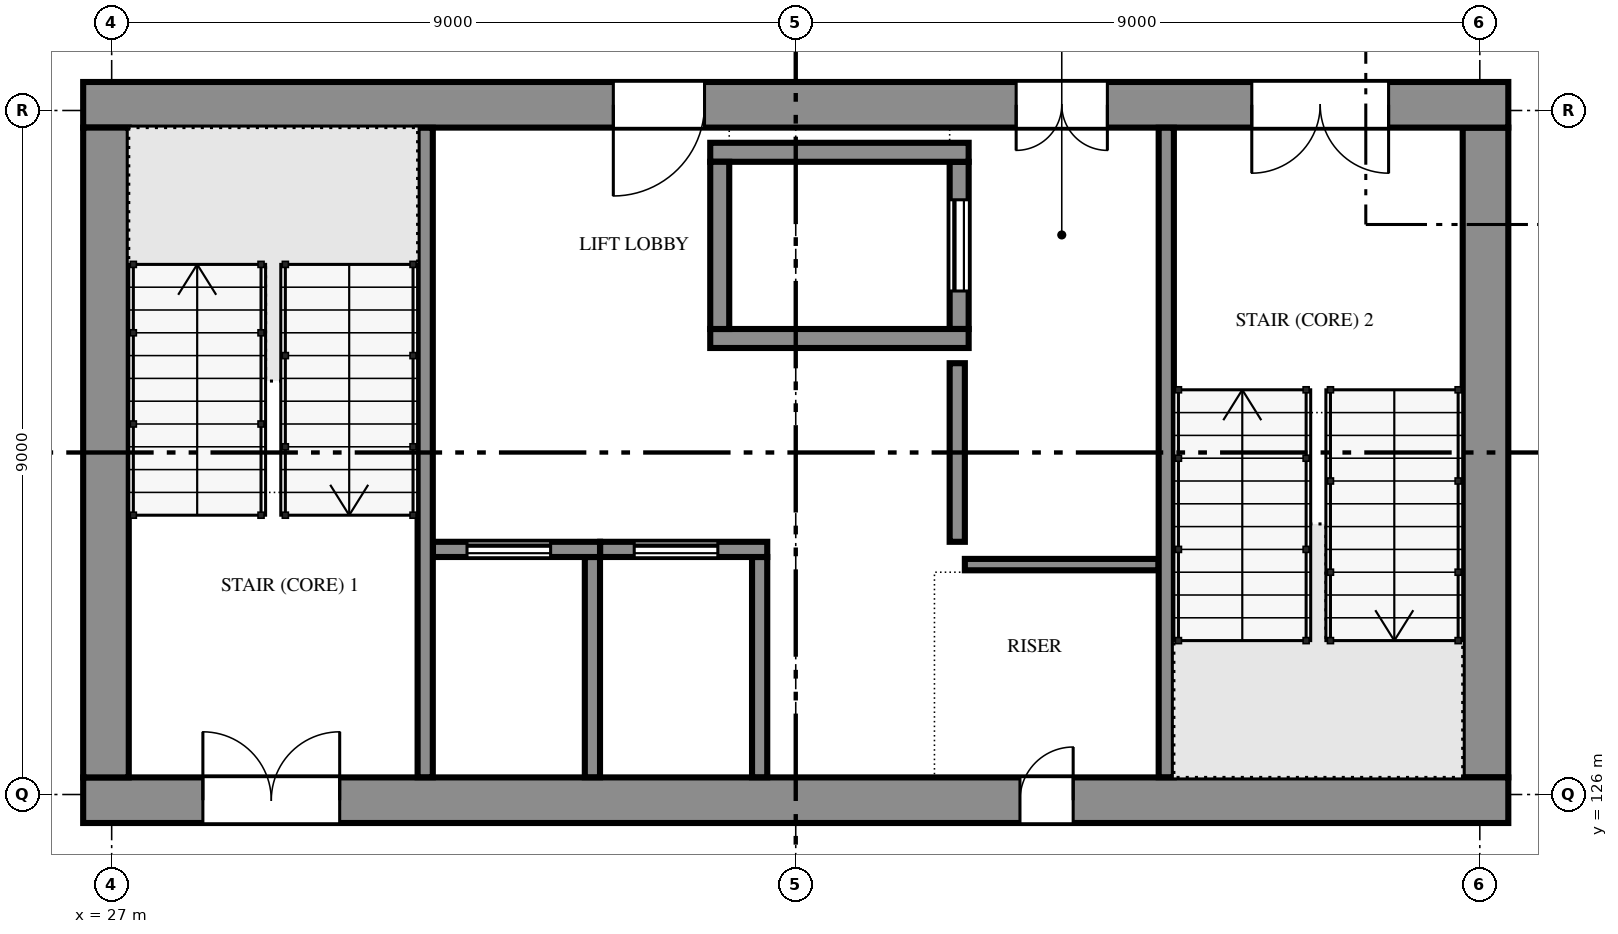
"""IFC4 building model, lengths in metres.
Left out: names, types, materials, properties, quantities, classifications, styles, units other than length and angle.
Written with IfcOpenShell. Run it as: python <this file> out.ifc"""

import sys

from ifc_helpers import new_model, si_unit, direction, frame, frame_2d, origin, place, context, subcontext, project, spatial, polyline, rectangle, outline, extrude, element, fill, save


model = new_model("IFC4")
c1 = context("Model", 3, precision=1e-05, world=origin(), true_north=direction((0.0, 1.0)))
c2 = subcontext(c1, "Body", "Model", "MODEL_VIEW")
j1 = project(units=[si_unit("LENGTHUNIT", "METRE"), si_unit("PLANEANGLEUNIT", "RADIAN")], contexts=[c1])
p1 = place(None, origin())
s1 = spatial("IfcSite", under=j1, at=p1, CompositionType="ELEMENT")
p2 = place(p1, origin())
s2 = spatial("IfcBuilding", under=s1, at=p2, CompositionType="ELEMENT")
p3 = place(p2, frame((0.0, 0.0, 7.5)))
s3 = spatial("IfcBuildingStorey", under=s2, at=p3, CompositionType="ELEMENT", Elevation=7.5)
p4 = place(p3, frame((26.625, 125.925, 0.0), z_axis=(0.0, 0.0, 1.0), x_axis=(1.0, 0.0, 0.0)))
e1 = element("IfcWall", 1, at=p4, inside=s3, PredefinedType="SOLIDWALL", context=c2, shape_type="SweptSolid", body=[
    extrude(rectangle(XDim=18.75, YDim=0.6, at=frame_2d((9.375, 0.0))), origin(), (0.0, 0.0, 1.0), 4.2),
])
p5 = place(p4, frame((1.575, 0.0, 0.0)))
e2 = element("IfcOpeningElement", 2, at=p5, cuts=e1, PredefinedType="OPENING", context=c2, shape_type="SweptSolid", body=[
    extrude(rectangle(XDim=1.8, YDim=2.1, at=frame_2d((0.9, 1.05))), frame((0.0, 0.31, 0.0), z_axis=(0.0, -1.0, 0.0), x_axis=(1.0, 0.0, 0.0)), (0.0, 0.0, 1.0), 0.62),
])
p6 = place(p4, frame((12.325, 0.0, 0.0)))
e3 = element("IfcOpeningElement", 3, at=p6, cuts=e1, PredefinedType="OPENING", context=c2, shape_type="SweptSolid", body=[
    extrude(rectangle(XDim=0.7, YDim=2.0, at=frame_2d((0.35, 1.0))), frame((0.0, 0.31, 0.0), z_axis=(0.0, -1.0, 0.0), x_axis=(1.0, 0.0, 0.0)), (0.0, 0.0, 1.0), 0.62),
])
p7 = place(p3, frame((26.625, 135.075, 0.0), z_axis=(0.0, 0.0, 1.0), x_axis=(1.0, 0.0, 0.0)))
e4 = element("IfcWall", 4, at=p7, inside=s3, PredefinedType="SOLIDWALL", context=c2, shape_type="SweptSolid", body=[
    extrude(rectangle(XDim=18.75, YDim=0.6, at=frame_2d((9.375, 0.0))), origin(), (0.0, 0.0, 1.0), 4.2),
])
p8 = place(p7, frame((15.375, 0.0, 0.0)))
e5 = element("IfcOpeningElement", 5, at=p8, cuts=e4, PredefinedType="OPENING", context=c2, shape_type="SweptSolid", body=[
    extrude(rectangle(XDim=1.8, YDim=2.1, at=frame_2d((0.9, 1.05))), frame((0.0, 0.31, 0.0), z_axis=(0.0, -1.0, 0.0), x_axis=(1.0, 0.0, 0.0)), (0.0, 0.0, 1.0), 0.62),
])
p9 = place(p7, frame((6.975, 0.0, 0.0)))
e6 = element("IfcOpeningElement", 6, at=p9, cuts=e4, PredefinedType="OPENING", context=c2, shape_type="SweptSolid", body=[
    extrude(rectangle(XDim=1.2, YDim=2.1, at=frame_2d((0.6, 1.05))), frame((0.0, 0.31, 0.0), z_axis=(0.0, -1.0, 0.0), x_axis=(1.0, 0.0, 0.0)), (0.0, 0.0, 1.0), 0.62),
])
p10 = place(p7, frame((12.275, 0.0, 0.0)))
e7 = element("IfcOpeningElement", 7, at=p10, cuts=e4, PredefinedType="OPENING", context=c2, shape_type="SweptSolid", body=[
    extrude(rectangle(XDim=1.2, YDim=2.1, at=frame_2d((0.6, 1.05))), frame((0.0, 0.31, 0.0), z_axis=(0.0, -1.0, 0.0), x_axis=(1.0, 0.0, 0.0)), (0.0, 0.0, 1.0), 0.62),
])
for number, where, z_axis, x_axis in (
    (8, (26.925, 126.225, 0.0), (0.0, 0.0, 1.0), (0.0, 1.0, 0.0)),
    (9, (45.075, 126.225, 0.0), (0.0, 0.0, 1.0), (0.0, 1.0, 0.0)),
):
    element("IfcWall", number, at=place(p3, frame(where, z_axis=z_axis, x_axis=x_axis)), inside=s3, PredefinedType="SOLIDWALL", context=c2, shape_type="SweptSolid", body=[
        extrude(rectangle(XDim=8.55, YDim=0.6, at=frame_2d((4.275, 0.0))), origin(), (0.0, 0.0, 1.0), 4.2),
    ])
for number, where, z_axis, x_axis in (
    (10, (31.125, 126.227, -0.13), (0.0, 0.0, 1.0), (0.0, 1.0, 0.0)),
    (11, (40.875, 126.227, -0.13), (0.0, 0.0, 1.0), (0.0, 1.0, 0.0)),
):
    element("IfcWall", number, at=place(p3, frame(where, z_axis=z_axis, x_axis=x_axis)), inside=s3, PredefinedType="SOLIDWALL", context=c2, shape_type="SweptSolid", body=[
        extrude(rectangle(XDim=8.546, YDim=0.2, at=frame_2d((4.273, 0.0))), origin(), (0.0, 0.0, 1.0), 3.666),
    ])
p11 = place(p3, frame((31.227, 129.225, 0.0), z_axis=(0.0, 0.0, 1.0), x_axis=(1.0, 0.0, 0.0)))
e12 = element("IfcWall", 12, at=p11, inside=s3, PredefinedType="SOLIDWALL", context=c2, shape_type="SweptSolid", body=[
    extrude(rectangle(XDim=2.198, YDim=0.2, at=frame_2d((1.099, 0.0))), origin(), (0.0, 0.0, 1.0), 3.516),
])
p12 = place(p11, frame((0.448, 0.0, 0.0)))
e13 = element("IfcOpeningElement", 13, at=p12, cuts=e12, PredefinedType="OPENING", context=c2, shape_type="SweptSolid", body=[
    extrude(rectangle(XDim=1.1, YDim=2.1, at=frame_2d((0.55, 1.05))), frame((0.0, 0.11, 0.0), z_axis=(0.0, -1.0, 0.0), x_axis=(1.0, 0.0, 0.0)), (0.0, 0.0, 1.0), 0.22),
])
p13 = place(p3, frame((33.325, 126.227, 0.0), z_axis=(0.0, 0.0, 1.0), x_axis=(0.0, 1.0, 0.0)))
e14 = element("IfcWall", 14, at=p13, inside=s3, PredefinedType="SOLIDWALL", context=c2, shape_type="SweptSolid", body=[
    extrude(rectangle(XDim=2.898, YDim=0.2, at=frame_2d((1.449, 0.0))), origin(), (0.0, 0.0, 1.0), 3.516),
])
p14 = place(p3, frame((33.427, 129.225, 0.0), z_axis=(0.0, 0.0, 1.0), x_axis=(1.0, 0.0, 0.0)))
e15 = element("IfcWall", 15, at=p14, inside=s3, PredefinedType="SOLIDWALL", context=c2, shape_type="SweptSolid", body=[
    extrude(rectangle(XDim=2.198, YDim=0.2, at=frame_2d((1.099, 0.0))), origin(), (0.0, 0.0, 1.0), 3.516),
])
p15 = place(p14, frame((0.448, 0.0, 0.0)))
e16 = element("IfcOpeningElement", 16, at=p15, cuts=e15, PredefinedType="OPENING", context=c2, shape_type="SweptSolid", body=[
    extrude(rectangle(XDim=1.1, YDim=2.1, at=frame_2d((0.55, 1.05))), frame((0.0, 0.11, 0.0), z_axis=(0.0, -1.0, 0.0), x_axis=(1.0, 0.0, 0.0)), (0.0, 0.0, 1.0), 0.22),
])
p16 = place(p3, frame((35.525, 126.227, 0.0), z_axis=(0.0, 0.0, 1.0), x_axis=(0.0, 1.0, 0.0)))
e17 = element("IfcWall", 17, at=p16, inside=s3, PredefinedType="SOLIDWALL", context=c2, shape_type="SweptSolid", body=[
    extrude(rectangle(XDim=2.898, YDim=0.2, at=frame_2d((1.449, 0.0))), origin(), (0.0, 0.0, 1.0), 3.516),
])
for number, where, z_axis, x_axis in (
    (18, (34.875, 132.0, 0.0), (0.0, 0.0, 1.0), (1.0, 0.0, 0.0)),
    (19, (34.875, 134.45, 0.0), (0.0, 0.0, 1.0), (1.0, 0.0, 0.0)),
):
    element("IfcWall", number, at=place(p3, frame(where, z_axis=z_axis, x_axis=x_axis)), inside=s3, PredefinedType="SOLIDWALL", context=c2, shape_type="SweptSolid", body=[
        extrude(rectangle(XDim=3.4, YDim=0.25, at=frame_2d((1.7, 0.0))), origin(), (0.0, 0.0, 1.0), 3.516),
    ])
p17 = place(p3, frame((35.0, 132.125, 0.0), z_axis=(0.0, 0.0, 1.0), x_axis=(0.0, 1.0, 0.0)))
e20 = element("IfcWall", 20, at=p17, inside=s3, PredefinedType="SOLIDWALL", context=c2, shape_type="SweptSolid", body=[
    extrude(rectangle(XDim=2.2, YDim=0.25, at=frame_2d((1.1, 0.0))), origin(), (0.0, 0.0, 1.0), 3.516),
])
p18 = place(p3, frame((38.15, 132.125, 0.0), z_axis=(0.0, 0.0, 1.0), x_axis=(0.0, 1.0, 0.0)))
e21 = element("IfcWall", 21, at=p18, inside=s3, PredefinedType="SOLIDWALL", context=c2, shape_type="SweptSolid", body=[
    extrude(rectangle(XDim=2.2, YDim=0.25, at=frame_2d((1.1, 0.0))), origin(), (0.0, 0.0, 1.0), 3.516),
])
p19 = place(p18, frame((0.5, 0.0, 0.0)))
e22 = element("IfcOpeningElement", 22, at=p19, cuts=e21, PredefinedType="OPENING", context=c2, shape_type="SweptSolid", body=[
    extrude(rectangle(XDim=1.2, YDim=2.1, at=frame_2d((0.6, 1.05))), frame((0.0, 0.135, 0.0), z_axis=(0.0, -1.0, 0.0), x_axis=(1.0, 0.0, 0.0)), (0.0, 0.0, 1.0), 0.27),
])
p20 = place(p3, frame((38.125, 131.675, 0.0), z_axis=(0.0, 0.0, 1.0), x_axis=(0.0, -1.0, 0.0)))
e23 = element("IfcWall", 23, at=p20, inside=s3, PredefinedType="PARTITIONING", context=c2, shape_type="SweptSolid", body=[
    extrude(rectangle(XDim=2.35, YDim=0.2, at=frame_2d((1.175, 0.0))), origin(), (0.0, 0.0, 1.0), 3.382),
])
p21 = place(p3, frame((40.773, 129.025, 0.0), z_axis=(0.0, 0.0, 1.0), x_axis=(-1.0, 0.0, 0.0)))
e24 = element("IfcWall", 24, at=p21, inside=s3, PredefinedType="SOLIDWALL", context=c2, shape_type="SweptSolid", body=[
    extrude(rectangle(XDim=2.548, YDim=0.15, at=frame_2d((1.274, 0.0))), origin(), (0.0, 0.0, 1.0), 3.536),
])
p22 = place(p12, origin())
e25 = element("IfcDoor", 25, at=p22, inside=s3, OperationType="SLIDING_TO_LEFT", PredefinedType="DOOR", context=c2, shape_type="SweptSolid", body=[
    extrude(outline(polyline([(0.0, 0.0), (0.07, 0.0), (0.07, 2.03), (1.03, 2.03), (1.03, 0.0), (1.1, 0.0), (1.1, 2.1), (0.0, 2.1), (0.0, 0.0)])), frame((0.0, 0.025, 0.0), z_axis=(0.0, -1.0, 0.0), x_axis=(1.0, 0.0, 0.0)), (0.0, 0.0, 1.0), 0.05),
    extrude(rectangle(XDim=0.524, YDim=2.016, at=frame_2d((0.336, 1.018))), frame((0.0, 0.018, 0.0), z_axis=(0.0, -1.0, 0.0), x_axis=(1.0, 0.0, 0.0)), (0.0, 0.0, 1.0), 0.016),
    extrude(rectangle(XDim=0.52, YDim=2.016, at=frame_2d((0.766, 1.018))), frame((0.0, -0.002, 0.0), z_axis=(0.0, -1.0, 0.0), x_axis=(1.0, 0.0, 0.0)), (0.0, 0.0, 1.0), 0.016),
])
fill(e13, e25)
p23 = place(p15, origin())
e26 = element("IfcDoor", 26, at=p23, inside=s3, OperationType="SLIDING_TO_LEFT", PredefinedType="DOOR", context=c2, shape_type="SweptSolid", body=[
    extrude(outline(polyline([(0.0, 0.0), (0.07, 0.0), (0.07, 2.03), (1.03, 2.03), (1.03, 0.0), (1.1, 0.0), (1.1, 2.1), (0.0, 2.1), (0.0, 0.0)])), frame((0.0, 0.025, 0.0), z_axis=(0.0, -1.0, 0.0), x_axis=(1.0, 0.0, 0.0)), (0.0, 0.0, 1.0), 0.05),
    extrude(rectangle(XDim=0.524, YDim=2.016, at=frame_2d((0.336, 1.018))), frame((0.0, 0.018, 0.0), z_axis=(0.0, -1.0, 0.0), x_axis=(1.0, 0.0, 0.0)), (0.0, 0.0, 1.0), 0.016),
    extrude(rectangle(XDim=0.52, YDim=2.016, at=frame_2d((0.766, 1.018))), frame((0.0, -0.002, 0.0), z_axis=(0.0, -1.0, 0.0), x_axis=(1.0, 0.0, 0.0)), (0.0, 0.0, 1.0), 0.016),
])
fill(e16, e26)
p24 = place(p19, origin())
e27 = element("IfcDoor", 27, at=p24, inside=s3, OperationType="SLIDING_TO_LEFT", PredefinedType="DOOR", context=c2, shape_type="SweptSolid", body=[
    extrude(outline(polyline([(0.0, 0.0), (0.07, 0.0), (0.07, 2.03), (1.13, 2.03), (1.13, 0.0), (1.2, 0.0), (1.2, 2.1), (0.0, 2.1), (0.0, 0.0)])), frame((0.0, 0.025, 0.0), z_axis=(0.0, -1.0, 0.0), x_axis=(1.0, 0.0, 0.0)), (0.0, 0.0, 1.0), 0.05),
    extrude(rectangle(XDim=0.579, YDim=2.016, at=frame_2d((0.363, 1.018))), frame((0.0, 0.018, 0.0), z_axis=(0.0, -1.0, 0.0), x_axis=(1.0, 0.0, 0.0)), (0.0, 0.0, 1.0), 0.016),
    extrude(rectangle(XDim=0.575, YDim=2.016, at=frame_2d((0.839, 1.018))), frame((0.0, -0.002, 0.0), z_axis=(0.0, -1.0, 0.0), x_axis=(1.0, 0.0, 0.0)), (0.0, 0.0, 1.0), 0.016),
])
fill(e22, e27)
p25 = place(p5, origin())
e28 = element("IfcDoor", 28, at=p25, inside=s3, OperationType="DOUBLE_DOOR_SINGLE_SWING", PredefinedType="DOOR", context=c2, shape_type="SweptSolid", body=[
    extrude(outline(polyline([(0.0, 0.0), (0.07, 0.0), (0.07, 2.03), (1.73, 2.03), (1.73, 0.0), (1.8, 0.0), (1.8, 2.1), (0.0, 2.1), (0.0, 0.0)])), frame((0.0, 0.025, 0.0), z_axis=(0.0, -1.0, 0.0), x_axis=(1.0, 0.0, 0.0)), (0.0, 0.0, 1.0), 0.05),
    extrude(outline(polyline([(0.074, 0.01), (0.897, 0.01), (0.897, 2.026), (0.074, 2.026), (0.074, 0.01)]), holes=[polyline([(0.194, 0.16), (0.777, 0.16), (0.777, 1.01), (0.194, 1.01), (0.194, 0.16)]), polyline([(0.335, 1.16), (0.635, 1.16), (0.635, 1.76), (0.335, 1.76), (0.335, 1.16)])]), frame((0.0, 0.017, 0.0), z_axis=(0.0, -1.0, 0.0), x_axis=(1.0, 0.0, 0.0)), (0.0, 0.0, 1.0), 0.035),
    extrude(rectangle(XDim=0.583, YDim=0.85, at=frame_2d((0.485, 0.585))), frame((0.0, 0.009, 0.0), z_axis=(0.0, -1.0, 0.0), x_axis=(1.0, 0.0, 0.0)), (0.0, 0.0, 1.0), 0.017),
    extrude(rectangle(XDim=0.3, YDim=0.6, at=frame_2d((0.485, 1.46))), frame((0.0, 0.006, 0.0), z_axis=(0.0, -1.0, 0.0), x_axis=(1.0, 0.0, 0.0)), (0.0, 0.0, 1.0), 0.012),
    extrude(outline(polyline([(0.903, 0.01), (1.726, 0.01), (1.726, 2.026), (0.903, 2.026), (0.903, 0.01)]), holes=[polyline([(1.023, 0.16), (1.606, 0.16), (1.606, 1.01), (1.023, 1.01), (1.023, 0.16)]), polyline([(1.165, 1.16), (1.465, 1.16), (1.465, 1.76), (1.165, 1.76), (1.165, 1.16)])]), frame((0.0, 0.017, 0.0), z_axis=(0.0, -1.0, 0.0), x_axis=(1.0, 0.0, 0.0)), (0.0, 0.0, 1.0), 0.035),
    extrude(rectangle(XDim=0.583, YDim=0.85, at=frame_2d((1.314, 0.585))), frame((0.0, 0.009, 0.0), z_axis=(0.0, -1.0, 0.0), x_axis=(1.0, 0.0, 0.0)), (0.0, 0.0, 1.0), 0.017),
    extrude(rectangle(XDim=0.3, YDim=0.6, at=frame_2d((1.314, 1.46))), frame((0.0, 0.006, 0.0), z_axis=(0.0, -1.0, 0.0), x_axis=(1.0, 0.0, 0.0)), (0.0, 0.0, 1.0), 0.012),
])
fill(e2, e28)
p26 = place(p8, frame((1.8, 0.0, 0.0), z_axis=(0.0, 0.0, 1.0), x_axis=(-1.0, 0.0, 0.0)))
e29 = element("IfcDoor", 29, at=p26, inside=s3, OperationType="DOUBLE_DOOR_SINGLE_SWING", PredefinedType="DOOR", context=c2, shape_type="SweptSolid", body=[
    extrude(outline(polyline([(0.0, 0.0), (0.07, 0.0), (0.07, 2.03), (1.73, 2.03), (1.73, 0.0), (1.8, 0.0), (1.8, 2.1), (0.0, 2.1), (0.0, 0.0)])), frame((0.0, 0.025, 0.0), z_axis=(0.0, -1.0, 0.0), x_axis=(1.0, 0.0, 0.0)), (0.0, 0.0, 1.0), 0.05),
    extrude(outline(polyline([(0.074, 0.01), (0.897, 0.01), (0.897, 2.026), (0.074, 2.026), (0.074, 0.01)]), holes=[polyline([(0.194, 0.16), (0.777, 0.16), (0.777, 1.01), (0.194, 1.01), (0.194, 0.16)]), polyline([(0.335, 1.16), (0.635, 1.16), (0.635, 1.76), (0.335, 1.76), (0.335, 1.16)])]), frame((0.0, 0.017, 0.0), z_axis=(0.0, -1.0, 0.0), x_axis=(1.0, 0.0, 0.0)), (0.0, 0.0, 1.0), 0.035),
    extrude(rectangle(XDim=0.583, YDim=0.85, at=frame_2d((0.485, 0.585))), frame((0.0, 0.009, 0.0), z_axis=(0.0, -1.0, 0.0), x_axis=(1.0, 0.0, 0.0)), (0.0, 0.0, 1.0), 0.017),
    extrude(rectangle(XDim=0.3, YDim=0.6, at=frame_2d((0.485, 1.46))), frame((0.0, 0.006, 0.0), z_axis=(0.0, -1.0, 0.0), x_axis=(1.0, 0.0, 0.0)), (0.0, 0.0, 1.0), 0.012),
    extrude(outline(polyline([(0.903, 0.01), (1.726, 0.01), (1.726, 2.026), (0.903, 2.026), (0.903, 0.01)]), holes=[polyline([(1.023, 0.16), (1.606, 0.16), (1.606, 1.01), (1.023, 1.01), (1.023, 0.16)]), polyline([(1.165, 1.16), (1.465, 1.16), (1.465, 1.76), (1.165, 1.76), (1.165, 1.16)])]), frame((0.0, 0.017, 0.0), z_axis=(0.0, -1.0, 0.0), x_axis=(1.0, 0.0, 0.0)), (0.0, 0.0, 1.0), 0.035),
    extrude(rectangle(XDim=0.583, YDim=0.85, at=frame_2d((1.314, 0.585))), frame((0.0, 0.009, 0.0), z_axis=(0.0, -1.0, 0.0), x_axis=(1.0, 0.0, 0.0)), (0.0, 0.0, 1.0), 0.017),
    extrude(rectangle(XDim=0.3, YDim=0.6, at=frame_2d((1.314, 1.46))), frame((0.0, 0.006, 0.0), z_axis=(0.0, -1.0, 0.0), x_axis=(1.0, 0.0, 0.0)), (0.0, 0.0, 1.0), 0.012),
])
fill(e5, e29)
p27 = place(p9, frame((1.2, 0.0, 0.0), z_axis=(0.0, 0.0, 1.0), x_axis=(-1.0, 0.0, 0.0)))
e30 = element("IfcDoor", 30, at=p27, inside=s3, OperationType="DOUBLE_DOOR_SINGLE_SWING", PredefinedType="DOOR", context=c2, shape_type="SweptSolid", body=[
    extrude(outline(polyline([(0.0, 0.0), (0.07, 0.0), (0.07, 2.03), (1.13, 2.03), (1.13, 0.0), (1.2, 0.0), (1.2, 2.1), (0.0, 2.1), (0.0, 0.0)])), frame((0.0, 0.025, 0.0), z_axis=(0.0, -1.0, 0.0), x_axis=(1.0, 0.0, 0.0)), (0.0, 0.0, 1.0), 0.05),
    extrude(outline(polyline([(0.074, 0.01), (0.597, 0.01), (0.597, 2.026), (0.074, 2.026), (0.074, 0.01)]), holes=[polyline([(0.178, 0.373), (0.492, 0.373), (0.492, 1.784), (0.178, 1.784), (0.178, 0.373)])]), frame((0.0, 0.017, 0.0), z_axis=(0.0, -1.0, 0.0), x_axis=(1.0, 0.0, 0.0)), (0.0, 0.0, 1.0), 0.035),
    extrude(rectangle(XDim=0.314, YDim=1.411, at=frame_2d((0.335, 1.079))), frame((0.0, 0.009, 0.0), z_axis=(0.0, -1.0, 0.0), x_axis=(1.0, 0.0, 0.0)), (0.0, 0.0, 1.0), 0.017),
    extrude(outline(polyline([(0.603, 0.01), (1.126, 0.01), (1.126, 2.026), (0.603, 2.026), (0.603, 0.01)]), holes=[polyline([(0.708, 0.373), (1.021, 0.373), (1.021, 1.784), (0.708, 1.784), (0.708, 0.373)])]), frame((0.0, 0.017, 0.0), z_axis=(0.0, -1.0, 0.0), x_axis=(1.0, 0.0, 0.0)), (0.0, 0.0, 1.0), 0.035),
    extrude(rectangle(XDim=0.314, YDim=1.411, at=frame_2d((0.865, 1.079))), frame((0.0, 0.009, 0.0), z_axis=(0.0, -1.0, 0.0), x_axis=(1.0, 0.0, 0.0)), (0.0, 0.0, 1.0), 0.017),
])
fill(e6, e30)
p28 = place(p10, frame((1.2, 0.0, 0.0), z_axis=(0.0, 0.0, 1.0), x_axis=(-1.0, 0.0, 0.0)))
e31 = element("IfcDoor", 31, at=p28, inside=s3, OperationType="DOUBLE_DOOR_SINGLE_SWING", PredefinedType="DOOR", context=c2, shape_type="SweptSolid", body=[
    extrude(outline(polyline([(0.0, 0.0), (0.07, 0.0), (0.07, 2.03), (1.13, 2.03), (1.13, 0.0), (1.2, 0.0), (1.2, 2.1), (0.0, 2.1), (0.0, 0.0)])), frame((0.0, 0.025, 0.0), z_axis=(0.0, -1.0, 0.0), x_axis=(1.0, 0.0, 0.0)), (0.0, 0.0, 1.0), 0.05),
    extrude(outline(polyline([(0.074, 0.01), (0.597, 0.01), (0.597, 2.026), (0.074, 2.026), (0.074, 0.01)]), holes=[polyline([(0.178, 0.373), (0.492, 0.373), (0.492, 1.784), (0.178, 1.784), (0.178, 0.373)])]), frame((0.0, 0.017, 0.0), z_axis=(0.0, -1.0, 0.0), x_axis=(1.0, 0.0, 0.0)), (0.0, 0.0, 1.0), 0.035),
    extrude(rectangle(XDim=0.314, YDim=1.411, at=frame_2d((0.335, 1.079))), frame((0.0, 0.009, 0.0), z_axis=(0.0, -1.0, 0.0), x_axis=(1.0, 0.0, 0.0)), (0.0, 0.0, 1.0), 0.017),
    extrude(outline(polyline([(0.603, 0.01), (1.126, 0.01), (1.126, 2.026), (0.603, 2.026), (0.603, 0.01)]), holes=[polyline([(0.708, 0.373), (1.021, 0.373), (1.021, 1.784), (0.708, 1.784), (0.708, 0.373)])]), frame((0.0, 0.017, 0.0), z_axis=(0.0, -1.0, 0.0), x_axis=(1.0, 0.0, 0.0)), (0.0, 0.0, 1.0), 0.035),
    extrude(rectangle(XDim=0.314, YDim=1.411, at=frame_2d((0.865, 1.079))), frame((0.0, 0.009, 0.0), z_axis=(0.0, -1.0, 0.0), x_axis=(1.0, 0.0, 0.0)), (0.0, 0.0, 1.0), 0.017),
])
fill(e7, e31)
p29 = place(p6, origin())
e32 = element("IfcDoor", 32, at=p29, inside=s3, OperationType="SINGLE_SWING_RIGHT", PredefinedType="DOOR", context=c2, shape_type="SweptSolid", body=[
    extrude(outline(polyline([(0.0, 0.0), (0.07, 0.0), (0.07, 1.93), (0.63, 1.93), (0.63, 0.0), (0.7, 0.0), (0.7, 2.0), (0.0, 2.0), (0.0, 0.0)])), frame((0.0, 0.025, 0.0), z_axis=(0.0, -1.0, 0.0), x_axis=(1.0, 0.0, 0.0)), (0.0, 0.0, 1.0), 0.05),
    extrude(outline(polyline([(0.074, 0.01), (0.626, 0.01), (0.626, 1.926), (0.074, 1.926), (0.074, 0.01)]), holes=[polyline([(0.184, 0.16), (0.516, 0.16), (0.516, 1.01), (0.184, 1.01), (0.184, 0.16)]), polyline([(0.2, 1.16), (0.5, 1.16), (0.5, 1.76), (0.2, 1.76), (0.2, 1.16)])]), frame((0.0, 0.017, 0.0), z_axis=(0.0, -1.0, 0.0), x_axis=(1.0, 0.0, 0.0)), (0.0, 0.0, 1.0), 0.035),
    extrude(rectangle(XDim=0.331, YDim=0.85, at=frame_2d((0.35, 0.585))), frame((0.0, 0.009, 0.0), z_axis=(0.0, -1.0, 0.0), x_axis=(1.0, 0.0, 0.0)), (0.0, 0.0, 1.0), 0.017),
    extrude(rectangle(XDim=0.3, YDim=0.6, at=frame_2d((0.35, 1.46))), frame((0.0, 0.006, 0.0), z_axis=(0.0, -1.0, 0.0), x_axis=(1.0, 0.0, 0.0)), (0.0, 0.0, 1.0), 0.012),
])
fill(e3, e32)
save(model, sys.argv[1])
